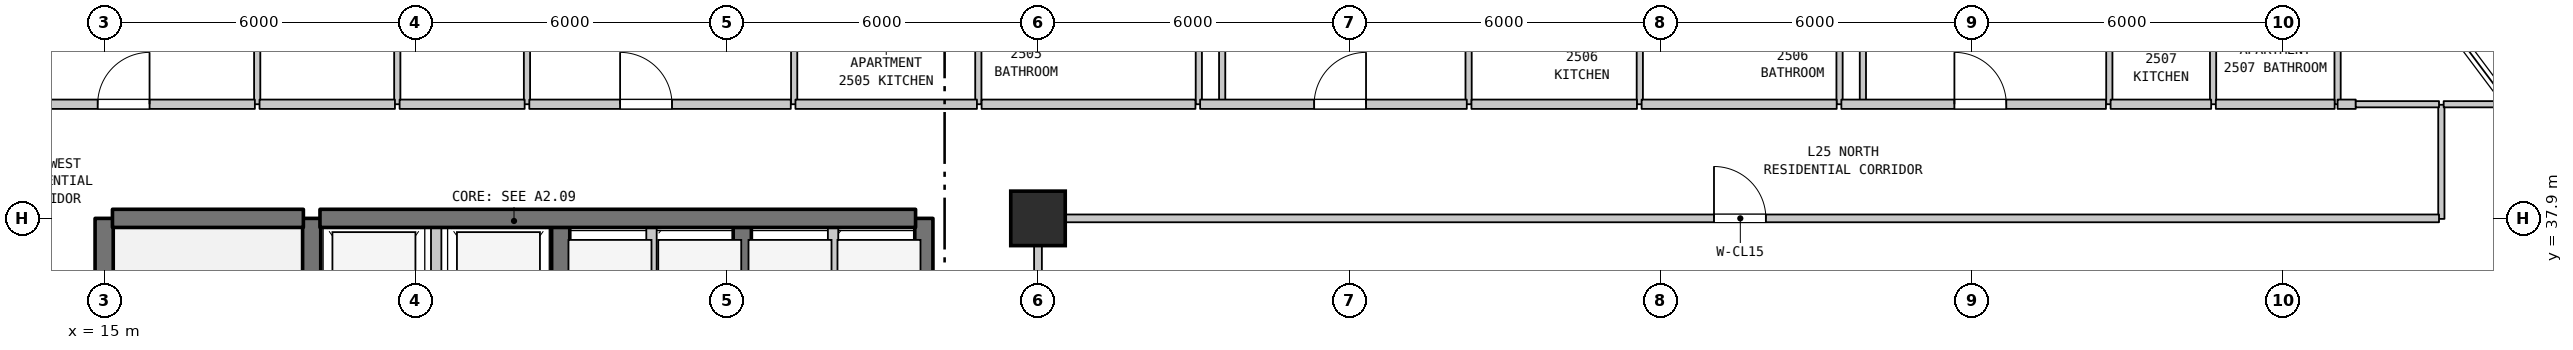
"""IFC4 building model, lengths in metres.
Left out: names, types, materials, properties, quantities, classifications, styles, units other than length and angle.
Written with IfcOpenShell. Run it as: python <this file> out.ifc"""

import sys

from ifc_helpers import new_model, si_unit, direction, frame, frame_2d, origin, origin_2d, place, context, subcontext, project, spatial, rectangle, extrude, element, fill, save


model = new_model("IFC4")
c1 = context("Model", 3, precision=1e-05, world=origin(), true_north=direction((0.0, 1.0)))
c2 = subcontext(c1, "Body", "Model", "MODEL_VIEW")
j1 = project(units=[si_unit("LENGTHUNIT", "METRE"), si_unit("PLANEANGLEUNIT", "RADIAN")], contexts=[c1])
p1 = place(None, origin())
s1 = spatial("IfcSite", under=j1, at=p1, CompositionType="ELEMENT")
p2 = place(p1, origin())
s2 = spatial("IfcBuilding", under=s1, at=p2, CompositionType="ELEMENT")
p3 = place(p2, frame((0.0, 0.0, 105.7)))
s3 = spatial("IfcBuildingStorey", under=s2, at=p3, CompositionType="ELEMENT", Elevation=105.7)
p4 = place(p3, frame((33.0, 37.9, 0.0), z_axis=(0.0, 0.0, 1.0), x_axis=(1.0, 0.0, 0.0)))
e1 = element("IfcColumn", 1, at=p4, inside=s3, PredefinedType="COLUMN", context=c2, shape_type="SweptSolid", body=[
    extrude(rectangle(XDim=1.05, YDim=1.05, at=origin_2d()), origin(), (0.0, 0.0, 1.0), 3.7),
])
p5 = place(p3, frame((15.0, 31.1, 0.0), z_axis=(0.0, 0.0, 1.0), x_axis=(0.0, 1.0, 0.0)))
e2 = element("IfcWall", 2, at=p5, inside=s3, PredefinedType="SHEAR", context=c2, shape_type="SweptSolid", body=[
    extrude(rectangle(XDim=6.8, YDim=0.35, at=frame_2d((3.4, 0.0))), origin(), (0.0, 0.0, 1.0), 3.385),
])
p6 = place(p3, frame((17.95, 40.1, 0.0), z_axis=(0.0, 0.0, 1.0), x_axis=(0.0, 1.0, 0.0)))
e3 = element("IfcWall", 3, at=p6, inside=s3, PredefinedType="PARTITIONING", context=c2, shape_type="SweptSolid", body=[
    extrude(rectangle(XDim=3.2, YDim=0.12, at=frame_2d((1.6, 0.0))), origin(), (0.0, 0.0, 1.0), 3.385),
])
p7 = place(p3, frame((19.0, 35.0, 0.0), z_axis=(0.0, 0.0, 1.0), x_axis=(0.0, 1.0, 0.0)))
e4 = element("IfcWall", 4, at=p7, inside=s3, PredefinedType="SHEAR", context=c2, shape_type="SweptSolid", body=[
    extrude(rectangle(XDim=2.9, YDim=0.35, at=frame_2d((1.45, 0.0))), origin(), (0.0, 0.0, 1.0), 3.385),
])
p8 = place(p3, frame((20.65, 40.1, 0.0), z_axis=(0.0, 0.0, 1.0), x_axis=(0.0, 1.0, 0.0)))
e5 = element("IfcWall", 5, at=p8, inside=s3, PredefinedType="PARTITIONING", context=c2, shape_type="SweptSolid", body=[
    extrude(rectangle(XDim=3.2, YDim=0.12, at=frame_2d((1.6, 0.0))), origin(), (0.0, 0.0, 1.0), 3.385),
])
p9 = place(p8, frame((1.15, 0.0, 0.0)))
e6 = element("IfcOpeningElement", 6, at=p9, cuts=e5, PredefinedType="OPENING", context=c2, shape_type="SweptSolid", body=[
    extrude(rectangle(XDim=0.9, YDim=2.15, at=frame_2d((0.45, 1.075))), frame((0.0, 0.07, 0.0), z_axis=(0.0, -1.0, 0.0), x_axis=(1.0, 0.0, 0.0)), (0.0, 0.0, 1.0), 0.14),
])
p10 = place(p3, frame((21.4, 35.0, 0.0), z_axis=(0.0, 0.0, 1.0), x_axis=(0.0, 1.0, 0.0)))
e7 = element("IfcWall", 7, at=p10, inside=s3, PredefinedType="STANDARD", context=c2, shape_type="SweptSolid", body=[
    extrude(rectangle(XDim=2.9, YDim=0.2, at=frame_2d((1.45, 0.0))), origin(), (0.0, 0.0, 1.0), 3.385),
])
p11 = place(p3, frame((23.15, 40.1, 0.0), z_axis=(0.0, 0.0, 1.0), x_axis=(0.0, 1.0, 0.0)))
e8 = element("IfcWall", 8, at=p11, inside=s3, PredefinedType="PARTITIONING", context=c2, shape_type="SweptSolid", body=[
    extrude(rectangle(XDim=2.05, YDim=0.12, at=frame_2d((1.025, 0.0))), origin(), (0.0, 0.0, 1.0), 3.385),
])
p12 = place(p3, frame((23.8, 35.0, 0.0), z_axis=(0.0, 0.0, 1.0), x_axis=(0.0, 1.0, 0.0)))
e9 = element("IfcWall", 9, at=p12, inside=s3, PredefinedType="SHEAR", context=c2, shape_type="SweptSolid", body=[
    extrude(rectangle(XDim=2.9, YDim=0.35, at=frame_2d((1.45, 0.0))), origin(), (0.0, 0.0, 1.0), 3.385),
])
p13 = place(p3, frame((25.55, 35.0, 0.0), z_axis=(0.0, 0.0, 1.0), x_axis=(0.0, 1.0, 0.0)))
e10 = element("IfcWall", 10, at=p13, inside=s3, PredefinedType="STANDARD", context=c2, shape_type="SweptSolid", body=[
    extrude(rectangle(XDim=2.9, YDim=0.2, at=frame_2d((1.45, 0.0))), origin(), (0.0, 0.0, 1.0), 3.385),
])
p14 = place(p3, frame((27.3, 35.0, 0.0), z_axis=(0.0, 0.0, 1.0), x_axis=(0.0, 1.0, 0.0)))
e11 = element("IfcWall", 11, at=p14, inside=s3, PredefinedType="SHEAR", context=c2, shape_type="SweptSolid", body=[
    extrude(rectangle(XDim=2.9, YDim=0.35, at=frame_2d((1.45, 0.0))), origin(), (0.0, 0.0, 1.0), 3.385),
])
p15 = place(p3, frame((28.3, 40.1, 0.0), z_axis=(0.0, 0.0, 1.0), x_axis=(0.0, 1.0, 0.0)))
e12 = element("IfcWall", 12, at=p15, inside=s3, PredefinedType="PARTITIONING", context=c2, shape_type="SweptSolid", body=[
    extrude(rectangle(XDim=2.3, YDim=0.12, at=frame_2d((1.15, 0.0))), origin(), (0.0, 0.0, 1.0), 3.385),
])
p16 = place(p3, frame((29.05, 35.0, 0.0), z_axis=(0.0, 0.0, 1.0), x_axis=(0.0, 1.0, 0.0)))
e13 = element("IfcWall", 13, at=p16, inside=s3, PredefinedType="STANDARD", context=c2, shape_type="SweptSolid", body=[
    extrude(rectangle(XDim=2.9, YDim=0.2, at=frame_2d((1.45, 0.0))), origin(), (0.0, 0.0, 1.0), 3.385),
])
p17 = place(p3, frame((30.8, 35.0, 0.0), z_axis=(0.0, 0.0, 1.0), x_axis=(0.0, 1.0, 0.0)))
e14 = element("IfcWall", 14, at=p17, inside=s3, PredefinedType="SHEAR", context=c2, shape_type="SweptSolid", body=[
    extrude(rectangle(XDim=2.9, YDim=0.35, at=frame_2d((1.45, 0.0))), origin(), (0.0, 0.0, 1.0), 3.385),
])
p18 = place(p3, frame((31.85, 40.1, 0.0), z_axis=(0.0, 0.0, 1.0), x_axis=(0.0, 1.0, 0.0)))
e15 = element("IfcWall", 15, at=p18, inside=s3, PredefinedType="PARTITIONING", context=c2, shape_type="SweptSolid", body=[
    extrude(rectangle(XDim=2.3, YDim=0.12, at=frame_2d((1.15, 0.0))), origin(), (0.0, 0.0, 1.0), 3.385),
])
p19 = place(p3, frame((33.0, 27.91, 0.0), z_axis=(0.0, 0.0, 1.0), x_axis=(0.0, 1.0, 0.0)))
e16 = element("IfcWall", 16, at=p19, inside=s3, PredefinedType="STANDARD", context=c2, shape_type="SweptSolid", body=[
    extrude(rectangle(XDim=9.98, YDim=0.15, at=frame_2d((4.99, 0.0))), origin(), (0.0, 0.0, 1.0), 2.885),
])
p20 = place(p3, frame((36.1, 40.1, 0.0), z_axis=(0.0, 0.0, 1.0), x_axis=(0.0, 1.0, 0.0)))
e17 = element("IfcWall", 17, at=p20, inside=s3, PredefinedType="PARTITIONING", context=c2, shape_type="SweptSolid", body=[
    extrude(rectangle(XDim=2.3, YDim=0.12, at=frame_2d((1.15, 0.0))), origin(), (0.0, 0.0, 1.0), 3.385),
])
p21 = place(p3, frame((36.55, 40.1, 0.0), z_axis=(0.0, 0.0, 1.0), x_axis=(0.0, 1.0, 0.0)))
e18 = element("IfcWall", 18, at=p21, inside=s3, PredefinedType="PARTITIONING", context=c2, shape_type="SweptSolid", body=[
    extrude(rectangle(XDim=13.79, YDim=0.12, at=frame_2d((6.895, 0.0))), origin(), (0.0, 0.0, 1.0), 3.385),
])
for number, where, z_axis, x_axis in (
    (19, (41.3, 40.1, 0.0), (0.0, 0.0, 1.0), (0.0, 1.0, 0.0)),
    (20, (44.6, 40.1, 0.0), (0.0, 0.0, 1.0), (0.0, 1.0, 0.0)),
    (21, (48.45, 40.1, 0.0), (0.0, 0.0, 1.0), (0.0, 1.0, 0.0)),
):
    element("IfcWall", number, at=place(p3, frame(where, z_axis=z_axis, x_axis=x_axis)), inside=s3, PredefinedType="PARTITIONING", context=c2, shape_type="SweptSolid", body=[
        extrude(rectangle(XDim=2.3, YDim=0.12, at=frame_2d((1.15, 0.0))), origin(), (0.0, 0.0, 1.0), 3.385),
    ])
p22 = place(p3, frame((48.9, 40.1, 0.0), z_axis=(0.0, 0.0, 1.0), x_axis=(0.0, 1.0, 0.0)))
e22 = element("IfcWall", 22, at=p22, inside=s3, PredefinedType="PARTITIONING", context=c2, shape_type="SweptSolid", body=[
    extrude(rectangle(XDim=13.79, YDim=0.12, at=frame_2d((6.895, 0.0))), origin(), (0.0, 0.0, 1.0), 3.385),
])
for number, where, z_axis, x_axis in (
    (23, (53.65, 40.1, 0.0), (0.0, 0.0, 1.0), (0.0, 1.0, 0.0)),
    (24, (55.65, 40.1, 0.0), (0.0, 0.0, 1.0), (0.0, 1.0, 0.0)),
    (25, (58.05, 40.1, 0.0), (0.0, 0.0, 1.0), (0.0, 1.0, 0.0)),
):
    element("IfcWall", number, at=place(p3, frame(where, z_axis=z_axis, x_axis=x_axis)), inside=s3, PredefinedType="PARTITIONING", context=c2, shape_type="SweptSolid", body=[
        extrude(rectangle(XDim=2.3, YDim=0.12, at=frame_2d((1.15, 0.0))), origin(), (0.0, 0.0, 1.0), 3.385),
    ])
p23 = place(p3, frame((60.05, 37.89, 0.0), z_axis=(0.0, 0.0, 1.0), x_axis=(0.0, 1.0, 0.0)))
e26 = element("IfcWall", 26, at=p23, inside=s3, PredefinedType="PARTITIONING", context=c2, shape_type="SweptSolid", body=[
    extrude(rectangle(XDim=2.2, YDim=0.12, at=frame_2d((1.1, 0.0))), origin(), (0.0, 0.0, 1.0), 3.385),
])
p24 = place(p3, frame((15.16, 37.9, 0.0), z_axis=(0.0, 0.0, 1.0), x_axis=(1.0, 0.0, 0.0)))
e27 = element("IfcWall", 27, at=p24, inside=s3, PredefinedType="SHEAR", context=c2, shape_type="SweptSolid", body=[
    extrude(rectangle(XDim=3.68, YDim=0.35, at=frame_2d((1.84, 0.0))), origin(), (0.0, 0.0, 1.0), 3.385),
])
p25 = place(p3, frame((19.16, 37.9, 0.0), z_axis=(0.0, 0.0, 1.0), x_axis=(1.0, 0.0, 0.0)))
e28 = element("IfcWall", 28, at=p25, inside=s3, PredefinedType="SHEAR", context=c2, shape_type="SweptSolid", body=[
    extrude(rectangle(XDim=11.48, YDim=0.35, at=frame_2d((5.74, 0.0))), origin(), (0.0, 0.0, 1.0), 3.385),
])
p26 = place(p3, frame((33.07, 37.9, 0.0), z_axis=(0.0, 0.0, 1.0), x_axis=(1.0, 0.0, 0.0)))
e29 = element("IfcWall", 29, at=p26, inside=s3, PredefinedType="STANDARD", context=c2, shape_type="SweptSolid", body=[
    extrude(rectangle(XDim=26.935, YDim=0.15, at=frame_2d((13.467, 0.0))), origin(), (0.0, 0.0, 1.0), 3.385),
])
p27 = place(p26, frame((12.96, 0.0, 0.0)))
e30 = element("IfcOpeningElement", 30, at=p27, cuts=e29, PredefinedType="OPENING", context=c2, shape_type="SweptSolid", body=[
    extrude(rectangle(XDim=1.0, YDim=2.15, at=frame_2d((0.5, 1.075))), frame((0.0, 0.085, 0.0), z_axis=(0.0, -1.0, 0.0), x_axis=(1.0, 0.0, 0.0)), (0.0, 0.0, 1.0), 0.17),
])
p28 = place(p3, frame((12.875, 40.1, 0.0), z_axis=(0.0, 0.0, 1.0), x_axis=(1.0, 0.0, 0.0)))
e31 = element("IfcWall", 31, at=p28, inside=s3, PredefinedType="STANDARD", context=c2, shape_type="SweptSolid", body=[
    extrude(rectangle(XDim=5.03, YDim=0.18, at=frame_2d((2.515, 0.0))), origin(), (0.0, 0.0, 1.0), 3.385),
])
p29 = place(p28, frame((2.0, 0.0, 0.0)))
e32 = element("IfcOpeningElement", 32, at=p29, cuts=e31, PredefinedType="OPENING", context=c2, shape_type="SweptSolid", body=[
    extrude(rectangle(XDim=1.0, YDim=2.15, at=frame_2d((0.5, 1.075))), frame((0.0, 0.1, 0.0), z_axis=(0.0, -1.0, 0.0), x_axis=(1.0, 0.0, 0.0)), (0.0, 0.0, 1.0), 0.2),
])
p30 = place(p3, frame((17.995, 40.1, 0.0), z_axis=(0.0, 0.0, 1.0), x_axis=(1.0, 0.0, 0.0)))
e33 = element("IfcWall", 33, at=p30, inside=s3, PredefinedType="STANDARD", context=c2, shape_type="SweptSolid", body=[
    extrude(rectangle(XDim=2.61, YDim=0.18, at=frame_2d((1.305, 0.0))), origin(), (0.0, 0.0, 1.0), 3.385),
])
p31 = place(p3, frame((20.695, 40.1, 0.0), z_axis=(0.0, 0.0, 1.0), x_axis=(1.0, 0.0, 0.0)))
e34 = element("IfcWall", 34, at=p31, inside=s3, PredefinedType="STANDARD", context=c2, shape_type="SweptSolid", body=[
    extrude(rectangle(XDim=2.41, YDim=0.18, at=frame_2d((1.205, 0.0))), origin(), (0.0, 0.0, 1.0), 3.385),
])
p32 = place(p3, frame((23.195, 40.1, 0.0), z_axis=(0.0, 0.0, 1.0), x_axis=(1.0, 0.0, 0.0)))
e35 = element("IfcWall", 35, at=p32, inside=s3, PredefinedType="STANDARD", context=c2, shape_type="SweptSolid", body=[
    extrude(rectangle(XDim=5.04, YDim=0.18, at=frame_2d((2.52, 0.0))), origin(), (0.0, 0.0, 1.0), 3.385),
])
p33 = place(p32, frame((1.75, 0.0, 0.0)))
e36 = element("IfcOpeningElement", 36, at=p33, cuts=e35, PredefinedType="OPENING", context=c2, shape_type="SweptSolid", body=[
    extrude(rectangle(XDim=1.0, YDim=2.15, at=frame_2d((0.5, 1.075))), frame((0.0, 0.1, 0.0), z_axis=(0.0, -1.0, 0.0), x_axis=(1.0, 0.0, 0.0)), (0.0, 0.0, 1.0), 0.2),
])
p34 = place(p3, frame((28.325, 40.1, 0.0), z_axis=(0.0, 0.0, 1.0), x_axis=(1.0, 0.0, 0.0)))
e37 = element("IfcWall", 37, at=p34, inside=s3, PredefinedType="STANDARD", context=c2, shape_type="SweptSolid", body=[
    extrude(rectangle(XDim=3.498, YDim=0.18, at=frame_2d((1.749, 0.0))), origin(), (0.0, 0.0, 1.0), 3.385),
])
p35 = place(p3, frame((31.913, 40.1, 0.0), z_axis=(0.0, 0.0, 1.0), x_axis=(1.0, 0.0, 0.0)))
e38 = element("IfcWall", 38, at=p35, inside=s3, PredefinedType="STANDARD", context=c2, shape_type="SweptSolid", body=[
    extrude(rectangle(XDim=4.122, YDim=0.18, at=frame_2d((2.061, 0.0))), origin(), (0.0, 0.0, 1.0), 3.385),
])
p36 = place(p3, frame((36.125, 40.1, 0.0), z_axis=(0.0, 0.0, 1.0), x_axis=(1.0, 0.0, 0.0)))
e39 = element("IfcWall", 39, at=p36, inside=s3, PredefinedType="STANDARD", context=c2, shape_type="SweptSolid", body=[
    extrude(rectangle(XDim=5.14, YDim=0.18, at=frame_2d((2.57, 0.0))), origin(), (0.0, 0.0, 1.0), 3.385),
])
p37 = place(p36, frame((2.198, 0.0, 0.0)))
e40 = element("IfcOpeningElement", 40, at=p37, cuts=e39, PredefinedType="OPENING", context=c2, shape_type="SweptSolid", body=[
    extrude(rectangle(XDim=1.0, YDim=2.15, at=frame_2d((0.5, 1.075))), frame((0.0, 0.1, 0.0), z_axis=(0.0, -1.0, 0.0), x_axis=(1.0, 0.0, 0.0)), (0.0, 0.0, 1.0), 0.2),
])
p38 = place(p3, frame((41.355, 40.1, 0.0), z_axis=(0.0, 0.0, 1.0), x_axis=(1.0, 0.0, 0.0)))
e41 = element("IfcWall", 41, at=p38, inside=s3, PredefinedType="STANDARD", context=c2, shape_type="SweptSolid", body=[
    extrude(rectangle(XDim=3.19, YDim=0.18, at=frame_2d((1.595, 0.0))), origin(), (0.0, 0.0, 1.0), 3.385),
])
p39 = place(p3, frame((44.635, 40.1, 0.0), z_axis=(0.0, 0.0, 1.0), x_axis=(1.0, 0.0, 0.0)))
e42 = element("IfcWall", 42, at=p39, inside=s3, PredefinedType="STANDARD", context=c2, shape_type="SweptSolid", body=[
    extrude(rectangle(XDim=3.76, YDim=0.18, at=frame_2d((1.88, 0.0))), origin(), (0.0, 0.0, 1.0), 3.385),
])
p40 = place(p3, frame((48.485, 40.1, 0.0), z_axis=(0.0, 0.0, 1.0), x_axis=(1.0, 0.0, 0.0)))
e43 = element("IfcWall", 43, at=p40, inside=s3, PredefinedType="STANDARD", context=c2, shape_type="SweptSolid", body=[
    extrude(rectangle(XDim=5.1, YDim=0.18, at=frame_2d((2.55, 0.0))), origin(), (0.0, 0.0, 1.0), 3.385),
])
p41 = place(p40, frame((2.179, 0.0, 0.0)))
e44 = element("IfcOpeningElement", 44, at=p41, cuts=e43, PredefinedType="OPENING", context=c2, shape_type="SweptSolid", body=[
    extrude(rectangle(XDim=1.0, YDim=2.15, at=frame_2d((0.5, 1.075))), frame((0.0, 0.1, 0.0), z_axis=(0.0, -1.0, 0.0), x_axis=(1.0, 0.0, 0.0)), (0.0, 0.0, 1.0), 0.2),
])
p42 = place(p3, frame((53.675, 40.1, 0.0), z_axis=(0.0, 0.0, 1.0), x_axis=(1.0, 0.0, 0.0)))
e45 = element("IfcWall", 45, at=p42, inside=s3, PredefinedType="STANDARD", context=c2, shape_type="SweptSolid", body=[
    extrude(rectangle(XDim=1.938, YDim=0.18, at=frame_2d((0.969, 0.0))), origin(), (0.0, 0.0, 1.0), 3.385),
])
p43 = place(p3, frame((55.703, 40.1, 0.0), z_axis=(0.0, 0.0, 1.0), x_axis=(1.0, 0.0, 0.0)))
e46 = element("IfcWall", 46, at=p43, inside=s3, PredefinedType="STANDARD", context=c2, shape_type="SweptSolid", body=[
    extrude(rectangle(XDim=2.29, YDim=0.18, at=frame_2d((1.145, 0.0))), origin(), (0.0, 0.0, 1.0), 3.385),
])
p44 = place(p3, frame((58.05, 40.1, 0.0), z_axis=(0.0, 0.0, 1.0), x_axis=(1.0, 0.0, 0.0)))
e47 = element("IfcWall", 47, at=p44, inside=s3, PredefinedType="STANDARD", context=c2, shape_type="SweptSolid", body=[
    extrude(rectangle(XDim=0.35, YDim=0.18, at=frame_2d((0.175, 0.0))), origin(), (0.0, 0.0, 1.0), 3.385),
])
p45 = place(p3, frame((58.4, 40.1, 0.0), z_axis=(0.0, 0.0, 1.0), x_axis=(1.0, 0.0, 0.0)))
e48 = element("IfcWall", 48, at=p45, inside=s3, PredefinedType="PARTITIONING", context=c2, shape_type="SweptSolid", body=[
    extrude(rectangle(XDim=1.605, YDim=0.12, at=frame_2d((0.802, 0.0))), origin(), (0.0, 0.0, 1.0), 3.385),
])
p46 = place(p3, frame((60.095, 40.1, 0.0), z_axis=(0.0, 0.0, 1.0), x_axis=(1.0, 0.0, 0.0)))
e49 = element("IfcWall", 49, at=p46, inside=s3, PredefinedType="PARTITIONING", context=c2, shape_type="SweptSolid", body=[
    extrude(rectangle(XDim=1.245, YDim=0.12, at=frame_2d((0.623, 0.0))), origin(), (0.0, 0.0, 1.0), 3.385),
])
p47 = place(p27, origin())
e50 = element("IfcDoor", 50, at=p47, inside=s3, OperationType="SINGLE_SWING_LEFT", PredefinedType="DOOR", context=c2, shape_type="SweptSolid", body=[
    extrude(rectangle(XDim=1.0, YDim=2.15, at=frame_2d((0.5, 1.075))), frame((0.0, 0.025, 0.0), z_axis=(0.0, -1.0, 0.0), x_axis=(1.0, 0.0, 0.0)), (0.0, 0.0, 1.0), 0.05),
])
fill(e30, e50)
p48 = place(p29, origin())
e51 = element("IfcDoor", 51, at=p48, inside=s3, OperationType="SINGLE_SWING_RIGHT", PredefinedType="DOOR", context=c2, shape_type="SweptSolid", body=[
    extrude(rectangle(XDim=1.0, YDim=2.15, at=frame_2d((0.5, 1.075))), frame((0.0, 0.025, 0.0), z_axis=(0.0, -1.0, 0.0), x_axis=(1.0, 0.0, 0.0)), (0.0, 0.0, 1.0), 0.05),
])
fill(e32, e51)
p49 = place(p33, origin())
e52 = element("IfcDoor", 52, at=p49, inside=s3, OperationType="SINGLE_SWING_LEFT", PredefinedType="DOOR", context=c2, shape_type="SweptSolid", body=[
    extrude(rectangle(XDim=1.0, YDim=2.15, at=frame_2d((0.5, 1.075))), frame((0.0, 0.025, 0.0), z_axis=(0.0, -1.0, 0.0), x_axis=(1.0, 0.0, 0.0)), (0.0, 0.0, 1.0), 0.05),
])
fill(e36, e52)
p50 = place(p37, origin())
e53 = element("IfcDoor", 53, at=p50, inside=s3, OperationType="SINGLE_SWING_RIGHT", PredefinedType="DOOR", context=c2, shape_type="SweptSolid", body=[
    extrude(rectangle(XDim=1.0, YDim=2.15, at=frame_2d((0.5, 1.075))), frame((0.0, 0.025, 0.0), z_axis=(0.0, -1.0, 0.0), x_axis=(1.0, 0.0, 0.0)), (0.0, 0.0, 1.0), 0.05),
])
fill(e40, e53)
p51 = place(p41, origin())
e54 = element("IfcDoor", 54, at=p51, inside=s3, OperationType="SINGLE_SWING_LEFT", PredefinedType="DOOR", context=c2, shape_type="SweptSolid", body=[
    extrude(rectangle(XDim=1.0, YDim=2.15, at=frame_2d((0.5, 1.075))), frame((0.0, 0.025, 0.0), z_axis=(0.0, -1.0, 0.0), x_axis=(1.0, 0.0, 0.0)), (0.0, 0.0, 1.0), 0.05),
])
fill(e44, e54)
save(model, sys.argv[1])
